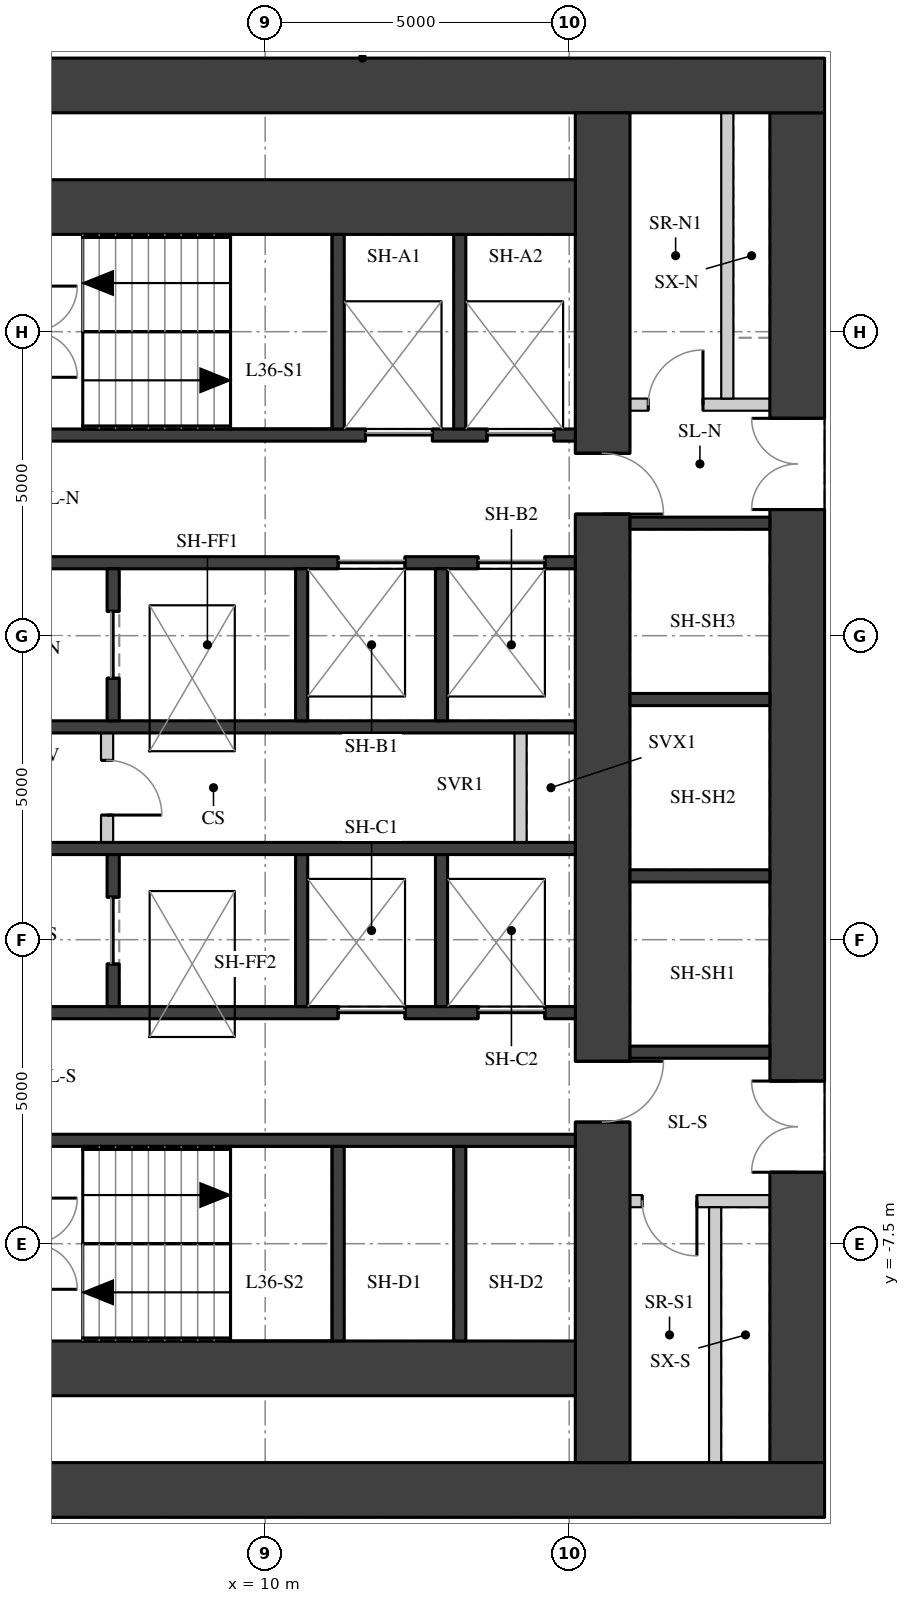
"""IFC4 building model, lengths in metres.
Left out: names, types, materials, properties, quantities, classifications, styles, units other than length and angle.
Written with IfcOpenShell. Run it as: python <this file> out.ifc"""

import sys

from ifc_helpers import new_model, si_unit, direction, frame, frame_2d, origin, place, context, subcontext, project, spatial, rectangle, extrude, element, fill, save


model = new_model("IFC4")
c1 = context("Model", 3, precision=1e-05, world=origin(), true_north=direction((0.0, 1.0)))
c2 = subcontext(c1, "Body", "Model", "MODEL_VIEW")
j1 = project(units=[si_unit("LENGTHUNIT", "METRE"), si_unit("PLANEANGLEUNIT", "RADIAN")], contexts=[c1])
p1 = place(None, origin())
s1 = spatial("IfcSite", under=j1, at=p1, CompositionType="ELEMENT")
p2 = place(p1, origin())
s2 = spatial("IfcBuilding", under=s1, at=p2, CompositionType="ELEMENT")
p3 = place(p2, frame((0.0, 0.0, 128.5)))
s3 = spatial("IfcBuildingStorey", under=s2, at=p3, CompositionType="ELEMENT", Elevation=128.5)
p4 = place(p3, frame((18.75, -11.1, 0.0), z_axis=(0.0, 0.0, 1.0), x_axis=(0.0, 1.0, 0.0)))
e1 = element("IfcWall", 1, at=p4, inside=s3, PredefinedType="SHEAR", context=c2, shape_type="SweptSolid", body=[
    extrude(rectangle(XDim=22.2, YDim=0.9, at=frame_2d((11.1, 0.0))), origin(), (0.0, 0.0, 1.0), 3.02),
])
p5 = place(p4, frame((15.675, 0.0, 0.0)))
e2 = element("IfcOpeningElement", 2, at=p5, cuts=e1, PredefinedType="OPENING", context=c2, shape_type="SweptSolid", body=[
    extrude(rectangle(XDim=1.5, YDim=2.1, at=frame_2d((0.75, 1.05))), frame((0.0, 0.46, 0.0), z_axis=(0.0, -1.0, 0.0), x_axis=(1.0, 0.0, 0.0)), (0.0, 0.0, 1.0), 0.92),
])
p6 = place(p4, frame((4.775, 0.0, 0.0)))
e3 = element("IfcOpeningElement", 3, at=p6, cuts=e1, PredefinedType="OPENING", context=c2, shape_type="SweptSolid", body=[
    extrude(rectangle(XDim=1.5, YDim=2.1, at=frame_2d((0.75, 1.05))), frame((0.0, 0.46, 0.0), z_axis=(0.0, -1.0, 0.0), x_axis=(1.0, 0.0, 0.0)), (0.0, 0.0, 1.0), 0.92),
])
for number, where, z_axis, x_axis in (
    (4, (4.0, 11.55, 0.0), (0.0, 0.0, 1.0), (1.0, 0.0, 0.0)),
    (5, (4.0, -11.55, 0.0), (0.0, 0.0, 1.0), (1.0, 0.0, 0.0)),
):
    element("IfcWall", number, at=place(p3, frame(where, z_axis=z_axis, x_axis=x_axis)), inside=s3, PredefinedType="SHEAR", context=c2, shape_type="SweptSolid", body=[
        extrude(rectangle(XDim=15.2, YDim=0.9, at=frame_2d((7.6, 0.0))), origin(), (0.0, 0.0, 1.0), 3.02),
    ])
p7 = place(p3, frame((15.55, -11.1, 0.0), z_axis=(0.0, 0.0, 1.0), x_axis=(0.0, 1.0, 0.0)))
e6 = element("IfcWall", 6, at=p7, inside=s3, PredefinedType="SHEAR", context=c2, shape_type="SweptSolid", body=[
    extrude(rectangle(XDim=22.2, YDim=0.9, at=frame_2d((11.1, 0.0))), origin(), (0.0, 0.0, 1.0), 3.02),
])
p8 = place(p7, frame((15.6, 0.0, 0.0)))
e7 = element("IfcOpeningElement", 7, at=p8, cuts=e6, PredefinedType="OPENING", context=c2, shape_type="SweptSolid", body=[
    extrude(rectangle(XDim=1.0, YDim=2.1, at=frame_2d((0.5, 1.05))), frame((0.0, 0.46, 0.0), z_axis=(0.0, -1.0, 0.0), x_axis=(1.0, 0.0, 0.0)), (0.0, 0.0, 1.0), 0.92),
])
p9 = place(p7, frame((5.6, 0.0, 0.0)))
e8 = element("IfcOpeningElement", 8, at=p9, cuts=e6, PredefinedType="OPENING", context=c2, shape_type="SweptSolid", body=[
    extrude(rectangle(XDim=1.0, YDim=2.1, at=frame_2d((0.5, 1.05))), frame((0.0, 0.46, 0.0), z_axis=(0.0, -1.0, 0.0), x_axis=(1.0, 0.0, 0.0)), (0.0, 0.0, 1.0), 0.92),
])
for number, where, z_axis, x_axis in (
    (9, (4.9, 9.55, 0.0), (0.0, 0.0, 1.0), (1.0, 0.0, 0.0)),
    (10, (4.9, -9.55, 0.0), (0.0, 0.0, 1.0), (1.0, 0.0, 0.0)),
):
    element("IfcWall", number, at=place(p3, frame(where, z_axis=z_axis, x_axis=x_axis)), inside=s3, PredefinedType="SHEAR", context=c2, shape_type="SweptSolid", body=[
        extrude(rectangle(XDim=10.2, YDim=0.9, at=frame_2d((5.1, 0.0))), origin(), (0.0, 0.0, 1.0), 3.02),
    ])
p10 = place(p3, frame((4.9, 5.8, 0.0), z_axis=(0.0, 0.0, 1.0), x_axis=(1.0, 0.0, 0.0)))
e11 = element("IfcWall", 11, at=p10, inside=s3, PredefinedType="SHEAR", context=c2, shape_type="SweptSolid", body=[
    extrude(rectangle(XDim=10.2, YDim=0.2, at=frame_2d((5.1, 0.0))), origin(), (0.0, 0.0, 1.0), 3.02),
])
p11 = place(p10, frame((6.75, 0.0, 0.0)))
e12 = element("IfcOpeningElement", 12, at=p11, cuts=e11, PredefinedType="OPENING", context=c2, shape_type="SweptSolid", body=[
    extrude(rectangle(XDim=1.1, YDim=2.1, at=frame_2d((0.55, 1.05))), frame((0.0, 0.11, 0.0), z_axis=(0.0, -1.0, 0.0), x_axis=(1.0, 0.0, 0.0)), (0.0, 0.0, 1.0), 0.22),
])
p12 = place(p10, frame((8.75, 0.0, 0.0)))
e13 = element("IfcOpeningElement", 13, at=p12, cuts=e11, PredefinedType="OPENING", context=c2, shape_type="SweptSolid", body=[
    extrude(rectangle(XDim=1.1, YDim=2.1, at=frame_2d((0.55, 1.05))), frame((0.0, 0.11, 0.0), z_axis=(0.0, -1.0, 0.0), x_axis=(1.0, 0.0, 0.0)), (0.0, 0.0, 1.0), 0.22),
])
p13 = place(p3, frame((4.9, 3.7, 0.0), z_axis=(0.0, 0.0, 1.0), x_axis=(1.0, 0.0, 0.0)))
e14 = element("IfcWall", 14, at=p13, inside=s3, PredefinedType="SHEAR", context=c2, shape_type="SweptSolid", body=[
    extrude(rectangle(XDim=10.2, YDim=0.2, at=frame_2d((5.1, 0.0))), origin(), (0.0, 0.0, 1.0), 3.02),
])
p14 = place(p13, frame((6.3, 0.0, 0.0)))
e15 = element("IfcOpeningElement", 15, at=p14, cuts=e14, PredefinedType="OPENING", context=c2, shape_type="SweptSolid", body=[
    extrude(rectangle(XDim=1.1, YDim=2.1, at=frame_2d((0.55, 1.05))), frame((0.0, 0.11, 0.0), z_axis=(0.0, -1.0, 0.0), x_axis=(1.0, 0.0, 0.0)), (0.0, 0.0, 1.0), 0.22),
])
p15 = place(p13, frame((8.6, 0.0, 0.0)))
e16 = element("IfcOpeningElement", 16, at=p15, cuts=e14, PredefinedType="OPENING", context=c2, shape_type="SweptSolid", body=[
    extrude(rectangle(XDim=1.1, YDim=2.1, at=frame_2d((0.55, 1.05))), frame((0.0, 0.11, 0.0), z_axis=(0.0, -1.0, 0.0), x_axis=(1.0, 0.0, 0.0)), (0.0, 0.0, 1.0), 0.22),
])
for number, where, z_axis, x_axis in (
    (17, (4.9, 1.0, 0.0), (0.0, 0.0, 1.0), (1.0, 0.0, 0.0)),
    (18, (4.9, -1.0, 0.0), (0.0, 0.0, 1.0), (1.0, 0.0, 0.0)),
):
    element("IfcWall", number, at=place(p3, frame(where, z_axis=z_axis, x_axis=x_axis)), inside=s3, PredefinedType="SHEAR", context=c2, shape_type="SweptSolid", body=[
        extrude(rectangle(XDim=10.2, YDim=0.2, at=frame_2d((5.1, 0.0))), origin(), (0.0, 0.0, 1.0), 3.02),
    ])
p16 = place(p3, frame((4.9, -3.7, 0.0), z_axis=(0.0, 0.0, 1.0), x_axis=(1.0, 0.0, 0.0)))
e19 = element("IfcWall", 19, at=p16, inside=s3, PredefinedType="SHEAR", context=c2, shape_type="SweptSolid", body=[
    extrude(rectangle(XDim=10.2, YDim=0.2, at=frame_2d((5.1, 0.0))), origin(), (0.0, 0.0, 1.0), 3.02),
])
p17 = place(p16, frame((6.3, 0.0, 0.0)))
e20 = element("IfcOpeningElement", 20, at=p17, cuts=e19, PredefinedType="OPENING", context=c2, shape_type="SweptSolid", body=[
    extrude(rectangle(XDim=1.1, YDim=2.1, at=frame_2d((0.55, 1.05))), frame((0.0, 0.11, 0.0), z_axis=(0.0, -1.0, 0.0), x_axis=(1.0, 0.0, 0.0)), (0.0, 0.0, 1.0), 0.22),
])
p18 = place(p16, frame((8.6, 0.0, 0.0)))
e21 = element("IfcOpeningElement", 21, at=p18, cuts=e19, PredefinedType="OPENING", context=c2, shape_type="SweptSolid", body=[
    extrude(rectangle(XDim=1.1, YDim=2.1, at=frame_2d((0.55, 1.05))), frame((0.0, 0.11, 0.0), z_axis=(0.0, -1.0, 0.0), x_axis=(1.0, 0.0, 0.0)), (0.0, 0.0, 1.0), 0.22),
])
p19 = place(p3, frame((4.9, -5.8, 0.0), z_axis=(0.0, 0.0, 1.0), x_axis=(1.0, 0.0, 0.0)))
e22 = element("IfcWall", 22, at=p19, inside=s3, PredefinedType="SHEAR", context=c2, shape_type="SweptSolid", body=[
    extrude(rectangle(XDim=10.2, YDim=0.2, at=frame_2d((5.1, 0.0))), origin(), (0.0, 0.0, 1.0), 3.02),
])
for number, where, z_axis, x_axis in (
    (23, (11.2, 5.9, 0.0), (0.0, 0.0, 1.0), (0.0, 1.0, 0.0)),
    (24, (11.2, -9.1, 0.0), (0.0, 0.0, 1.0), (0.0, 1.0, 0.0)),
    (25, (13.2, 5.9, 0.0), (0.0, 0.0, 1.0), (0.0, 1.0, 0.0)),
    (26, (13.2, -9.1, 0.0), (0.0, 0.0, 1.0), (0.0, 1.0, 0.0)),
):
    element("IfcWall", number, at=place(p3, frame(where, z_axis=z_axis, x_axis=x_axis)), inside=s3, PredefinedType="SHEAR", context=c2, shape_type="SweptSolid", body=[
        extrude(rectangle(XDim=3.2, YDim=0.2, at=frame_2d((1.6, 0.0))), origin(), (0.0, 0.0, 1.0), 3.02),
    ])
p20 = place(p3, frame((7.5, 1.1, 0.0), z_axis=(0.0, 0.0, 1.0), x_axis=(0.0, 1.0, 0.0)))
e27 = element("IfcWall", 27, at=p20, inside=s3, PredefinedType="SHEAR", context=c2, shape_type="SweptSolid", body=[
    extrude(rectangle(XDim=2.5, YDim=0.2, at=frame_2d((1.25, 0.0))), origin(), (0.0, 0.0, 1.0), 3.02),
])
p21 = place(p20, frame((0.7, 0.0, 0.0)))
e28 = element("IfcOpeningElement", 28, at=p21, cuts=e27, PredefinedType="OPENING", context=c2, shape_type="SweptSolid", body=[
    extrude(rectangle(XDim=1.1, YDim=2.1, at=frame_2d((0.55, 1.05))), frame((0.0, 0.11, 0.0), z_axis=(0.0, -1.0, 0.0), x_axis=(1.0, 0.0, 0.0)), (0.0, 0.0, 1.0), 0.22),
])
p22 = place(p3, frame((7.5, -3.6, 0.0), z_axis=(0.0, 0.0, 1.0), x_axis=(0.0, 1.0, 0.0)))
e29 = element("IfcWall", 29, at=p22, inside=s3, PredefinedType="SHEAR", context=c2, shape_type="SweptSolid", body=[
    extrude(rectangle(XDim=2.5, YDim=0.2, at=frame_2d((1.25, 0.0))), origin(), (0.0, 0.0, 1.0), 3.02),
])
p23 = place(p22, frame((0.7, 0.0, 0.0)))
e30 = element("IfcOpeningElement", 30, at=p23, cuts=e29, PredefinedType="OPENING", context=c2, shape_type="SweptSolid", body=[
    extrude(rectangle(XDim=1.1, YDim=2.1, at=frame_2d((0.55, 1.05))), frame((0.0, 0.11, 0.0), z_axis=(0.0, -1.0, 0.0), x_axis=(1.0, 0.0, 0.0)), (0.0, 0.0, 1.0), 0.22),
])
for number, where, z_axis, x_axis in (
    (31, (10.6, 1.1, 0.0), (0.0, 0.0, 1.0), (0.0, 1.0, 0.0)),
    (32, (10.6, -3.6, 0.0), (0.0, 0.0, 1.0), (0.0, 1.0, 0.0)),
    (33, (12.9, 1.1, 0.0), (0.0, 0.0, 1.0), (0.0, 1.0, 0.0)),
    (34, (12.9, -3.6, 0.0), (0.0, 0.0, 1.0), (0.0, 1.0, 0.0)),
):
    element("IfcWall", number, at=place(p3, frame(where, z_axis=z_axis, x_axis=x_axis)), inside=s3, PredefinedType="SHEAR", context=c2, shape_type="SweptSolid", body=[
        extrude(rectangle(XDim=2.5, YDim=0.2, at=frame_2d((1.25, 0.0))), origin(), (0.0, 0.0, 1.0), 3.02),
    ])
p24 = place(p3, frame((7.4, -0.9, 0.0), z_axis=(0.0, 0.0, 1.0), x_axis=(0.0, 1.0, 0.0)))
e35 = element("IfcWall", 35, at=p24, inside=s3, PredefinedType="PARTITIONING", context=c2, shape_type="SweptSolid", body=[
    extrude(rectangle(XDim=1.8, YDim=0.2, at=frame_2d((0.9, 0.0))), origin(), (0.0, 0.0, 1.0), 3.02),
])
p25 = place(p24, frame((0.45, 0.0, 0.0)))
e36 = element("IfcOpeningElement", 36, at=p25, cuts=e35, PredefinedType="OPENING", context=c2, shape_type="SweptSolid", body=[
    extrude(rectangle(XDim=0.9, YDim=2.1, at=frame_2d((0.45, 1.05))), frame((0.0, 0.11, 0.0), z_axis=(0.0, -1.0, 0.0), x_axis=(1.0, 0.0, 0.0)), (0.0, 0.0, 1.0), 0.22),
])
p26 = place(p3, frame((14.2, -0.9, 0.0), z_axis=(0.0, 0.0, 1.0), x_axis=(0.0, 1.0, 0.0)))
e37 = element("IfcWall", 37, at=p26, inside=s3, PredefinedType="PARTITIONING", context=c2, shape_type="SweptSolid", body=[
    extrude(rectangle(XDim=1.8, YDim=0.2, at=frame_2d((0.9, 0.0))), origin(), (0.0, 0.0, 1.0), 3.02),
])
for number, where, z_axis, x_axis in (
    (38, (16.0, -4.35, 0.0), (0.0, 0.0, 1.0), (1.0, 0.0, 0.0)),
    (39, (16.0, -1.45, 0.0), (0.0, 0.0, 1.0), (1.0, 0.0, 0.0)),
    (40, (16.0, 1.45, 0.0), (0.0, 0.0, 1.0), (1.0, 0.0, 0.0)),
    (41, (16.0, 4.35, 0.0), (0.0, 0.0, 1.0), (1.0, 0.0, 0.0)),
):
    element("IfcWall", number, at=place(p3, frame(where, z_axis=z_axis, x_axis=x_axis)), inside=s3, PredefinedType="SHEAR", context=c2, shape_type="SweptSolid", body=[
        extrude(rectangle(XDim=2.3, YDim=0.2, at=frame_2d((1.15, 0.0))), origin(), (0.0, 0.0, 1.0), 3.02),
    ])
p27 = place(p3, frame((16.0, 6.3, 0.0), z_axis=(0.0, 0.0, 1.0), x_axis=(1.0, 0.0, 0.0)))
e42 = element("IfcWall", 42, at=p27, inside=s3, PredefinedType="PARTITIONING", context=c2, shape_type="SweptSolid", body=[
    extrude(rectangle(XDim=2.3, YDim=0.2, at=frame_2d((1.15, 0.0))), origin(), (0.0, 0.0, 1.0), 3.02),
])
p28 = place(p27, frame((0.3, 0.0, 0.0)))
e43 = element("IfcOpeningElement", 43, at=p28, cuts=e42, PredefinedType="OPENING", context=c2, shape_type="SweptSolid", body=[
    extrude(rectangle(XDim=0.9, YDim=2.1, at=frame_2d((0.45, 1.05))), frame((0.0, 0.11, 0.0), z_axis=(0.0, -1.0, 0.0), x_axis=(1.0, 0.0, 0.0)), (0.0, 0.0, 1.0), 0.22),
])
p29 = place(p3, frame((17.6, 6.4, 0.0), z_axis=(0.0, 0.0, 1.0), x_axis=(0.0, 1.0, 0.0)))
e44 = element("IfcWall", 44, at=p29, inside=s3, PredefinedType="PARTITIONING", context=c2, shape_type="SweptSolid", body=[
    extrude(rectangle(XDim=4.7, YDim=0.2, at=frame_2d((2.35, 0.0))), origin(), (0.0, 0.0, 1.0), 3.02),
])
p30 = place(p3, frame((16.0, -6.8, 0.0), z_axis=(0.0, 0.0, 1.0), x_axis=(1.0, 0.0, 0.0)))
e45 = element("IfcWall", 45, at=p30, inside=s3, PredefinedType="PARTITIONING", context=c2, shape_type="SweptSolid", body=[
    extrude(rectangle(XDim=2.3, YDim=0.2, at=frame_2d((1.15, 0.0))), origin(), (0.0, 0.0, 1.0), 3.02),
])
p31 = place(p30, frame((0.2, 0.0, 0.0)))
e46 = element("IfcOpeningElement", 46, at=p31, cuts=e45, PredefinedType="OPENING", context=c2, shape_type="SweptSolid", body=[
    extrude(rectangle(XDim=0.9, YDim=2.1, at=frame_2d((0.45, 1.05))), frame((0.0, 0.11, 0.0), z_axis=(0.0, -1.0, 0.0), x_axis=(1.0, 0.0, 0.0)), (0.0, 0.0, 1.0), 0.22),
])
p32 = place(p3, frame((17.4, -11.1, 0.0), z_axis=(0.0, 0.0, 1.0), x_axis=(0.0, 1.0, 0.0)))
e47 = element("IfcWall", 47, at=p32, inside=s3, PredefinedType="PARTITIONING", context=c2, shape_type="SweptSolid", body=[
    extrude(rectangle(XDim=4.2, YDim=0.2, at=frame_2d((2.1, 0.0))), origin(), (0.0, 0.0, 1.0), 3.02),
])
p33 = place(p5, origin())
e48 = element("IfcDoor", 48, at=p33, inside=s3, OperationType="DOUBLE_DOOR_SINGLE_SWING", PredefinedType="DOOR", context=c2, shape_type="SweptSolid", body=[
    extrude(rectangle(XDim=1.5, YDim=2.1, at=frame_2d((0.75, 1.05))), frame((0.0, 0.025, 0.0), z_axis=(0.0, -1.0, 0.0), x_axis=(1.0, 0.0, 0.0)), (0.0, 0.0, 1.0), 0.05),
])
fill(e2, e48)
p34 = place(p6, origin())
e49 = element("IfcDoor", 49, at=p34, inside=s3, OperationType="DOUBLE_DOOR_SINGLE_SWING", PredefinedType="DOOR", context=c2, shape_type="SweptSolid", body=[
    extrude(rectangle(XDim=1.5, YDim=2.1, at=frame_2d((0.75, 1.05))), frame((0.0, 0.025, 0.0), z_axis=(0.0, -1.0, 0.0), x_axis=(1.0, 0.0, 0.0)), (0.0, 0.0, 1.0), 0.05),
])
fill(e3, e49)
p35 = place(p11, origin())
e50 = element("IfcDoor", 50, at=p35, inside=s3, OperationType="DOUBLE_DOOR_SLIDING", PredefinedType="DOOR", context=c2, shape_type="SweptSolid", body=[
    extrude(rectangle(XDim=1.1, YDim=2.1, at=frame_2d((0.55, 1.05))), frame((0.0, 0.025, 0.0), z_axis=(0.0, -1.0, 0.0), x_axis=(1.0, 0.0, 0.0)), (0.0, 0.0, 1.0), 0.05),
])
fill(e12, e50)
p36 = place(p12, origin())
e51 = element("IfcDoor", 51, at=p36, inside=s3, OperationType="DOUBLE_DOOR_SLIDING", PredefinedType="DOOR", context=c2, shape_type="SweptSolid", body=[
    extrude(rectangle(XDim=1.1, YDim=2.1, at=frame_2d((0.55, 1.05))), frame((0.0, 0.025, 0.0), z_axis=(0.0, -1.0, 0.0), x_axis=(1.0, 0.0, 0.0)), (0.0, 0.0, 1.0), 0.05),
])
fill(e13, e51)
p37 = place(p14, origin())
e52 = element("IfcDoor", 52, at=p37, inside=s3, OperationType="DOUBLE_DOOR_SLIDING", PredefinedType="DOOR", context=c2, shape_type="SweptSolid", body=[
    extrude(rectangle(XDim=1.1, YDim=2.1, at=frame_2d((0.55, 1.05))), frame((0.0, 0.025, 0.0), z_axis=(0.0, -1.0, 0.0), x_axis=(1.0, 0.0, 0.0)), (0.0, 0.0, 1.0), 0.05),
])
fill(e15, e52)
p38 = place(p15, origin())
e53 = element("IfcDoor", 53, at=p38, inside=s3, OperationType="DOUBLE_DOOR_SLIDING", PredefinedType="DOOR", context=c2, shape_type="SweptSolid", body=[
    extrude(rectangle(XDim=1.1, YDim=2.1, at=frame_2d((0.55, 1.05))), frame((0.0, 0.025, 0.0), z_axis=(0.0, -1.0, 0.0), x_axis=(1.0, 0.0, 0.0)), (0.0, 0.0, 1.0), 0.05),
])
fill(e16, e53)
p39 = place(p17, origin())
e54 = element("IfcDoor", 54, at=p39, inside=s3, OperationType="DOUBLE_DOOR_SLIDING", PredefinedType="DOOR", context=c2, shape_type="SweptSolid", body=[
    extrude(rectangle(XDim=1.1, YDim=2.1, at=frame_2d((0.55, 1.05))), frame((0.0, 0.025, 0.0), z_axis=(0.0, -1.0, 0.0), x_axis=(1.0, 0.0, 0.0)), (0.0, 0.0, 1.0), 0.05),
])
fill(e20, e54)
p40 = place(p18, origin())
e55 = element("IfcDoor", 55, at=p40, inside=s3, OperationType="DOUBLE_DOOR_SLIDING", PredefinedType="DOOR", context=c2, shape_type="SweptSolid", body=[
    extrude(rectangle(XDim=1.1, YDim=2.1, at=frame_2d((0.55, 1.05))), frame((0.0, 0.025, 0.0), z_axis=(0.0, -1.0, 0.0), x_axis=(1.0, 0.0, 0.0)), (0.0, 0.0, 1.0), 0.05),
])
fill(e21, e55)
p41 = place(p21, origin())
e56 = element("IfcDoor", 56, at=p41, inside=s3, OperationType="DOUBLE_DOOR_SLIDING", PredefinedType="DOOR", context=c2, shape_type="SweptSolid", body=[
    extrude(rectangle(XDim=1.1, YDim=2.1, at=frame_2d((0.55, 1.05))), frame((0.0, 0.025, 0.0), z_axis=(0.0, -1.0, 0.0), x_axis=(1.0, 0.0, 0.0)), (0.0, 0.0, 1.0), 0.05),
])
fill(e28, e56)
p42 = place(p23, origin())
e57 = element("IfcDoor", 57, at=p42, inside=s3, OperationType="DOUBLE_DOOR_SLIDING", PredefinedType="DOOR", context=c2, shape_type="SweptSolid", body=[
    extrude(rectangle(XDim=1.1, YDim=2.1, at=frame_2d((0.55, 1.05))), frame((0.0, 0.025, 0.0), z_axis=(0.0, -1.0, 0.0), x_axis=(1.0, 0.0, 0.0)), (0.0, 0.0, 1.0), 0.05),
])
fill(e30, e57)
p43 = place(p25, origin())
e58 = element("IfcDoor", 58, at=p43, inside=s3, OperationType="SINGLE_SWING_RIGHT", PredefinedType="DOOR", context=c2, shape_type="SweptSolid", body=[
    extrude(rectangle(XDim=0.9, YDim=2.1, at=frame_2d((0.45, 1.05))), frame((0.0, 0.025, 0.0), z_axis=(0.0, -1.0, 0.0), x_axis=(1.0, 0.0, 0.0)), (0.0, 0.0, 1.0), 0.05),
])
fill(e36, e58)
p44 = place(p8, origin())
e59 = element("IfcDoor", 59, at=p44, inside=s3, OperationType="SINGLE_SWING_RIGHT", PredefinedType="DOOR", context=c2, shape_type="SweptSolid", body=[
    extrude(rectangle(XDim=1.0, YDim=2.1, at=frame_2d((0.5, 1.05))), frame((0.0, 0.025, 0.0), z_axis=(0.0, -1.0, 0.0), x_axis=(1.0, 0.0, 0.0)), (0.0, 0.0, 1.0), 0.05),
])
fill(e7, e59)
p45 = place(p28, origin())
e60 = element("IfcDoor", 60, at=p45, inside=s3, OperationType="SINGLE_SWING_RIGHT", PredefinedType="DOOR", context=c2, shape_type="SweptSolid", body=[
    extrude(rectangle(XDim=0.9, YDim=2.1, at=frame_2d((0.45, 1.05))), frame((0.0, 0.025, 0.0), z_axis=(0.0, -1.0, 0.0), x_axis=(1.0, 0.0, 0.0)), (0.0, 0.0, 1.0), 0.05),
])
fill(e43, e60)
p46 = place(p9, origin())
e61 = element("IfcDoor", 61, at=p46, inside=s3, OperationType="SINGLE_SWING_LEFT", PredefinedType="DOOR", context=c2, shape_type="SweptSolid", body=[
    extrude(rectangle(XDim=1.0, YDim=2.1, at=frame_2d((0.5, 1.05))), frame((0.0, 0.025, 0.0), z_axis=(0.0, -1.0, 0.0), x_axis=(1.0, 0.0, 0.0)), (0.0, 0.0, 1.0), 0.05),
])
fill(e8, e61)
p47 = place(p31, origin())
e62 = element("IfcDoor", 62, at=p47, inside=s3, OperationType="SINGLE_SWING_LEFT", PredefinedType="DOOR", context=c2, shape_type="SweptSolid", body=[
    extrude(rectangle(XDim=0.9, YDim=2.1, at=frame_2d((0.45, 1.05))), frame((0.0, 0.025, 0.0), z_axis=(0.0, -1.0, 0.0), x_axis=(1.0, 0.0, 0.0)), (0.0, 0.0, 1.0), 0.05),
])
fill(e46, e62)
save(model, sys.argv[1])
